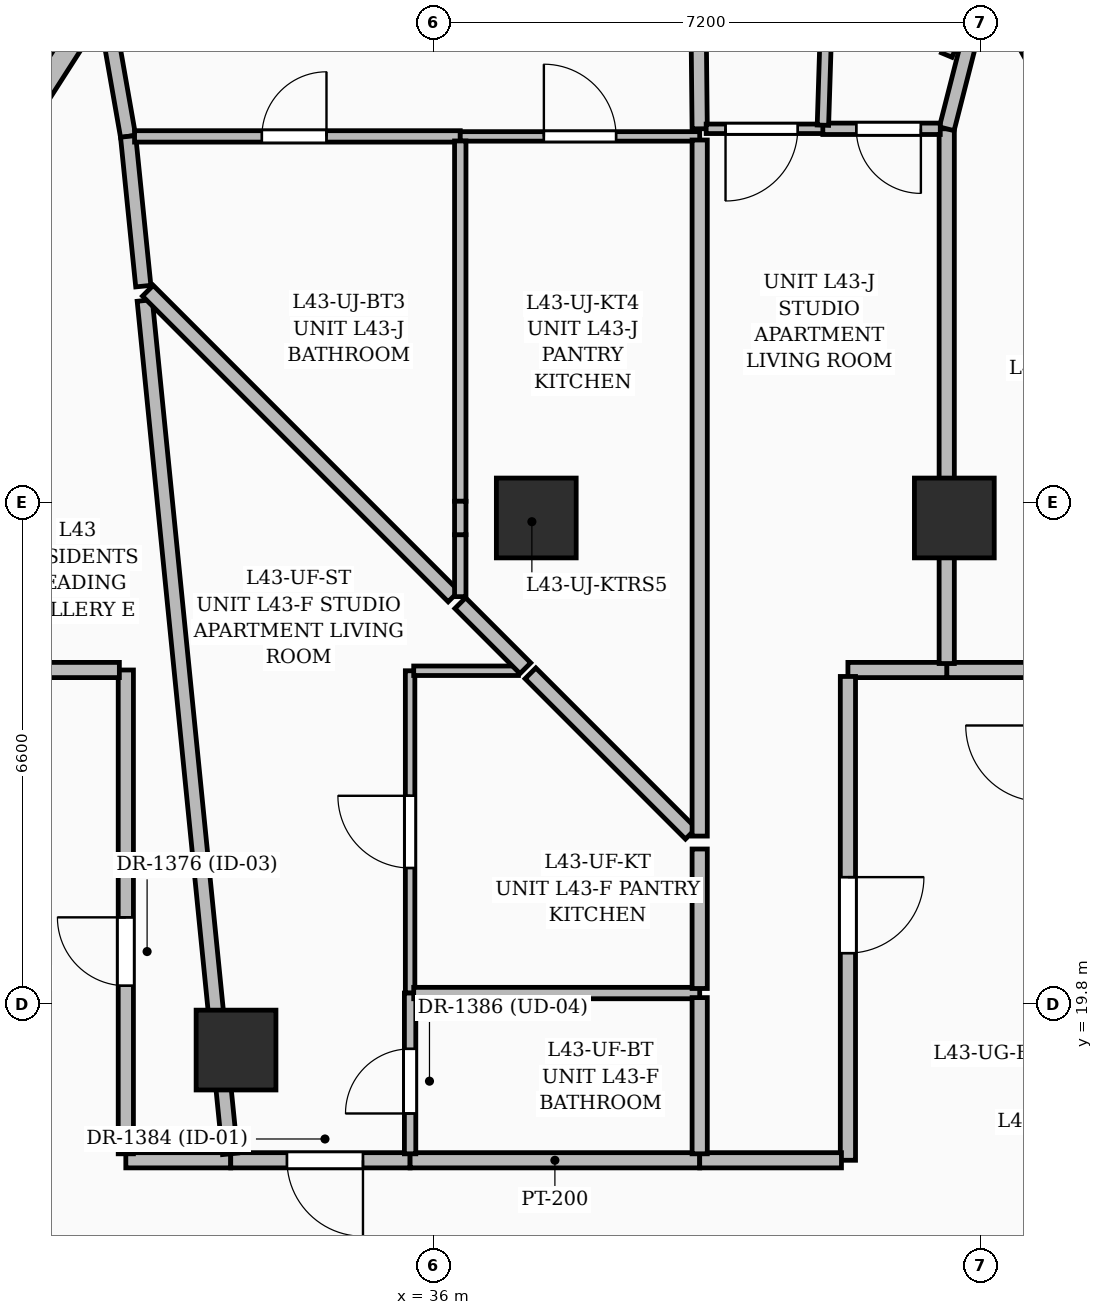
"""IFC4 building model, lengths in metres.
Left out: names, types, materials, properties, quantities, classifications, styles, units other than length and angle.
Written with IfcOpenShell. Run it as: python <this file> out.ifc"""

import sys

from ifc_helpers import new_model, si_unit, direction, frame, frame_2d, origin, origin_2d, place, context, subcontext, project, spatial, rectangle, extrude, element, fill, save


model = new_model("IFC4")
c1 = context("Model", 3, precision=1e-05, world=origin(), true_north=direction((0.0, 1.0)))
c2 = subcontext(c1, "Body", "Model", "MODEL_VIEW")
j1 = project(units=[si_unit("LENGTHUNIT", "METRE"), si_unit("PLANEANGLEUNIT", "RADIAN")], contexts=[c1])
p1 = place(None, origin())
s1 = spatial("IfcSite", under=j1, at=p1, CompositionType="ELEMENT")
p2 = place(p1, origin())
s2 = spatial("IfcBuilding", under=s1, at=p2, CompositionType="ELEMENT")
p3 = place(p2, frame((0.0, 0.0, 168.0)))
s3 = spatial("IfcBuildingStorey", under=s2, at=p3, CompositionType="ELEMENT", Elevation=168.0)
for number, where, z_axis, x_axis in (
    (1, (42.85, 26.2, 0.0), (0.0, 0.0, 1.0), (1.0, 0.0, 0.0)),
    (2, (37.35, 26.2, 0.0), (0.0, 0.0, 1.0), (1.0, 0.0, 0.0)),
    (3, (33.4, 19.2, 0.0), (0.0, 0.0, 1.0), (1.0, 0.0, 0.0)),
):
    element("IfcColumn", number, at=place(p3, frame(where, z_axis=z_axis, x_axis=x_axis)), inside=s3, PredefinedType="COLUMN", context=c2, shape_type="SweptSolid", body=[
        extrude(rectangle(XDim=1.05, YDim=1.05, at=origin_2d()), origin(), (0.0, 0.0, 1.0), 3.6),
    ])
p4 = place(p3, frame((27.986, 27.373, 0.0), z_axis=(0.0, 0.0, 1.0), x_axis=(0.539557017358, 0.841949063198, 0.0)))
e4 = element("IfcWall", 4, at=p4, inside=s3, PredefinedType="SOLIDWALL", context=c2, shape_type="SweptSolid", body=[
    extrude(rectangle(XDim=7.28, YDim=0.3, at=frame_2d((3.64, 0.0))), origin(), (0.0, 0.0, 1.0), 3.35),
])
p5 = place(p4, frame((0.9, 0.0, 0.6)))
e5 = element("IfcOpeningElement", 5, at=p5, cuts=e4, PredefinedType="OPENING", context=c2, shape_type="SweptSolid", body=[
    extrude(rectangle(XDim=1.5, YDim=2.1, at=frame_2d((0.75, 1.05))), frame((0.0, 0.16, 0.0), z_axis=(0.0, -1.0, 0.0), x_axis=(1.0, 0.0, 0.0)), (0.0, 0.0, 1.0), 0.32),
])
p6 = place(p3, frame((43.426, 33.195, 0.0), z_axis=(0.0, 0.0, 1.0), x_axis=(0.484187348611, -0.874964348671, 0.0)))
e6 = element("IfcWall", 6, at=p6, inside=s3, PredefinedType="SOLIDWALL", context=c2, shape_type="SweptSolid", body=[
    extrude(rectangle(XDim=7.451, YDim=0.3, at=frame_2d((3.726, 0.0))), origin(), (0.0, 0.0, 1.0), 3.35),
])
p7 = place(p6, frame((3.103, 0.0, 0.8)))
e7 = element("IfcOpeningElement", 7, at=p7, cuts=e6, PredefinedType="OPENING", context=c2, shape_type="SweptSolid", body=[
    extrude(rectangle(XDim=1.2, YDim=1.8, at=frame_2d((0.6, 0.9))), frame((0.0, 0.16, 0.0), z_axis=(0.0, -1.0, 0.0), x_axis=(1.0, 0.0, 0.0)), (0.0, 0.0, 1.0), 0.32),
])
p8 = place(p3, frame((33.33, 17.75, 0.0), z_axis=(0.0, 0.0, 1.0), x_axis=(-1.0, 0.0, 0.0)))
e8 = element("IfcWall", 8, at=p8, inside=s3, PredefinedType="PARTITIONING", context=c2, shape_type="SweptSolid", body=[
    extrude(rectangle(XDim=1.38, YDim=0.2, at=frame_2d((0.69, 0.0))), origin(), (0.0, 0.0, 1.0), 3.35),
])
p9 = place(p3, frame((31.95, 17.835, 0.0), z_axis=(0.0, 0.0, 1.0), x_axis=(0.0, 1.0, 0.0)))
e9 = element("IfcWall", 9, at=p9, inside=s3, PredefinedType="PARTITIONING", context=c2, shape_type="SweptSolid", body=[
    extrude(rectangle(XDim=6.365, YDim=0.2, at=frame_2d((3.183, 0.0))), origin(), (0.0, 0.0, 1.0), 2.393),
])
p10 = place(p9, frame((2.211, 0.0, 0.0)))
e10 = element("IfcOpeningElement", 10, at=p10, cuts=e9, PredefinedType="OPENING", context=c2, shape_type="SweptSolid", body=[
    extrude(rectangle(XDim=0.9, YDim=2.1, at=frame_2d((0.45, 1.05))), frame((0.0, 0.11, 0.0), z_axis=(0.0, -1.0, 0.0), x_axis=(1.0, 0.0, 0.0)), (0.0, 0.0, 1.0), 0.22),
])
p11 = place(p3, frame((31.865, 24.2, 0.0), z_axis=(0.0, 0.0, 1.0), x_axis=(-1.0, 0.0, 0.0)))
e11 = element("IfcWall", 11, at=p11, inside=s3, PredefinedType="PARTITIONING", context=c2, shape_type="SweptSolid", body=[
    extrude(rectangle(XDim=1.765, YDim=0.2, at=frame_2d((0.882, 0.0))), origin(), (0.0, 0.0, 1.0), 2.771),
])
p12 = place(p3, frame((35.69, 17.75, 0.0), z_axis=(0.0, 0.0, 1.0), x_axis=(-1.0, 0.0, 0.0)))
e12 = element("IfcWall", 12, at=p12, inside=s3, PredefinedType="PARTITIONING", context=c2, shape_type="SweptSolid", body=[
    extrude(rectangle(XDim=2.36, YDim=0.2, at=frame_2d((1.18, 0.0))), origin(), (0.0, 0.0, 1.0), 2.436),
])
p13 = place(p12, frame((0.62, 0.0, 0.0)))
e13 = element("IfcOpeningElement", 13, at=p13, cuts=e12, PredefinedType="OPENING", context=c2, shape_type="SweptSolid", body=[
    extrude(rectangle(XDim=1.0, YDim=2.2, at=frame_2d((0.5, 1.1))), frame((0.0, 0.11, 0.0), z_axis=(0.0, -1.0, 0.0), x_axis=(1.0, 0.0, 0.0)), (0.0, 0.0, 1.0), 0.22),
])
p14 = place(p3, frame((39.5, 17.75, 0.0), z_axis=(0.0, 0.0, 1.0), x_axis=(-1.0, 0.0, 0.0)))
e14 = element("IfcWall", 14, at=p14, inside=s3, PredefinedType="PARTITIONING", context=c2, shape_type="SweptSolid", body=[
    extrude(rectangle(XDim=3.81, YDim=0.2, at=frame_2d((1.905, 0.0))), origin(), (0.0, 0.0, 1.0), 3.35),
])
p15 = place(p3, frame((43.915, 24.2, 0.0), z_axis=(0.0, 0.0, 1.0), x_axis=(-1.0, 0.0, 0.0)))
e15 = element("IfcWall", 15, at=p15, inside=s3, PredefinedType="PARTITIONING", context=c2, shape_type="SweptSolid", body=[
    extrude(rectangle(XDim=1.165, YDim=0.2, at=frame_2d((0.583, 0.0))), origin(), (0.0, 0.0, 1.0), 2.436),
])
p16 = place(p3, frame((42.75, 24.2, 0.0), z_axis=(0.0, 0.0, 1.0), x_axis=(-1.0, 0.0, 0.0)))
e16 = element("IfcWall", 16, at=p16, inside=s3, PredefinedType="PARTITIONING", context=c2, shape_type="SweptSolid", body=[
    extrude(rectangle(XDim=1.3, YDim=0.2, at=frame_2d((0.65, 0.0))), origin(), (0.0, 0.0, 1.0), 3.35),
])
p17 = place(p3, frame((41.45, 24.115, 0.0), z_axis=(0.0, 0.0, 1.0), x_axis=(0.0, -1.0, 0.0)))
e17 = element("IfcWall", 17, at=p17, inside=s3, PredefinedType="PARTITIONING", context=c2, shape_type="SweptSolid", body=[
    extrude(rectangle(XDim=6.365, YDim=0.2, at=frame_2d((3.183, 0.0))), origin(), (0.0, 0.0, 1.0), 3.35),
])
p18 = place(p17, frame((2.64, 0.0, 0.0)))
e18 = element("IfcOpeningElement", 18, at=p18, cuts=e17, PredefinedType="OPENING", context=c2, shape_type="SweptSolid", body=[
    extrude(rectangle(XDim=1.0, YDim=2.2, at=frame_2d((0.5, 1.1))), frame((0.0, 0.11, 0.0), z_axis=(0.0, -1.0, 0.0), x_axis=(1.0, 0.0, 0.0)), (0.0, 0.0, 1.0), 0.22),
])
p19 = place(p3, frame((41.365, 17.75, 0.0), z_axis=(0.0, 0.0, 1.0), x_axis=(-1.0, 0.0, 0.0)))
e19 = element("IfcWall", 19, at=p19, inside=s3, PredefinedType="PARTITIONING", context=c2, shape_type="SweptSolid", body=[
    extrude(rectangle(XDim=1.865, YDim=0.2, at=frame_2d((0.933, 0.0))), origin(), (0.0, 0.0, 1.0), 3.35),
])
p20 = place(p3, frame((33.322, 17.835, 0.0), z_axis=(0.0, 0.0, 1.0), x_axis=(-0.099499433927, 0.99503761871, 0.0)))
e20 = element("IfcWall", 20, at=p20, inside=s3, PredefinedType="PARTITIONING", context=c2, shape_type="SweptSolid", body=[
    extrude(rectangle(XDim=11.282, YDim=0.2, at=frame_2d((5.641, 0.0))), origin(), (0.0, 0.0, 1.0), 2.393),
])
p21 = place(p3, frame((31.98, 31.22, 0.0), z_axis=(0.0, 0.0, 1.0), x_axis=(-0.17276967515, 0.984962252753, 0.0)))
e21 = element("IfcWall", 21, at=p21, inside=s3, PredefinedType="PARTITIONING", context=c2, shape_type="SweptSolid", body=[
    extrude(rectangle(XDim=1.673, YDim=0.2, at=frame_2d((0.836, 0.0))), origin(), (0.0, 0.0, 1.0), 2.57),
])
p22 = place(p3, frame((32.18, 29.25, 0.0), z_axis=(0.0, 0.0, 1.0), x_axis=(-0.100980739114, 0.994888380839, 0.0)))
e22 = element("IfcWall", 22, at=p22, inside=s3, PredefinedType="PARTITIONING", context=c2, shape_type="SweptSolid", body=[
    extrude(rectangle(XDim=1.98, YDim=0.2, at=frame_2d((0.99, 0.0))), origin(), (0.0, 0.0, 1.0), 2.57),
])
p23 = place(p3, frame((35.69, 19.95, 0.0), z_axis=(0.0, 0.0, 1.0), x_axis=(0.0, 1.0, 0.0)))
e23 = element("IfcWall", 23, at=p23, inside=s3, PredefinedType="PARTITIONING", context=c2, shape_type="SweptSolid", body=[
    extrude(rectangle(XDim=4.24, YDim=0.125, at=frame_2d((2.12, 0.0))), origin(), (0.0, 0.0, 1.0), 2.436),
])
p24 = place(p23, frame((1.645, 0.0, 0.0)))
e24 = element("IfcOpeningElement", 24, at=p24, cuts=e23, PredefinedType="OPENING", context=c2, shape_type="SweptSolid", body=[
    extrude(rectangle(XDim=0.95, YDim=2.2, at=frame_2d((0.475, 1.1))), frame((0.0, 0.072, 0.0), z_axis=(0.0, -1.0, 0.0), x_axis=(1.0, 0.0, 0.0)), (0.0, 0.0, 1.0), 0.145),
])
p25 = place(p3, frame((35.738, 24.19, 0.0), z_axis=(0.0, 0.0, 1.0), x_axis=(1.0, 0.0, 0.0)))
e25 = element("IfcWall", 25, at=p25, inside=s3, PredefinedType="PARTITIONING", context=c2, shape_type="SweptSolid", body=[
    extrude(rectangle(XDim=1.377, YDim=0.125, at=frame_2d((0.689, 0.0))), origin(), (0.0, 0.0, 1.0), 2.436),
])
p26 = place(p3, frame((35.69, 17.835, 0.0), z_axis=(0.0, 0.0, 1.0), x_axis=(0.0, 1.0, 0.0)))
e26 = element("IfcWall", 26, at=p26, inside=s3, PredefinedType="PARTITIONING", context=c2, shape_type="SweptSolid", body=[
    extrude(rectangle(XDim=2.115, YDim=0.15, at=frame_2d((1.058, 0.0))), origin(), (0.0, 0.0, 1.0), 3.35),
])
p27 = place(p26, frame((0.531, 0.0, 0.0)))
e27 = element("IfcOpeningElement", 27, at=p27, cuts=e26, PredefinedType="OPENING", context=c2, shape_type="SweptSolid", body=[
    extrude(rectangle(XDim=0.85, YDim=2.1, at=frame_2d((0.425, 1.05))), frame((0.0, 0.085, 0.0), z_axis=(0.0, -1.0, 0.0), x_axis=(1.0, 0.0, 0.0)), (0.0, 0.0, 1.0), 0.17),
])
p28 = place(p3, frame((36.262, 25.168, 0.0), z_axis=(0.0, 0.0, 1.0), x_axis=(-0.707128244111, 0.707085317611, 0.0)))
e28 = element("IfcWall", 28, at=p28, inside=s3, PredefinedType="PARTITIONING", context=c2, shape_type="SweptSolid", body=[
    extrude(rectangle(XDim=5.688, YDim=0.2, at=frame_2d((2.844, 0.0))), origin(), (0.0, 0.0, 1.0), 2.771),
])
p29 = place(p3, frame((37.206, 24.224, 0.0), z_axis=(0.0, 0.0, 1.0), x_axis=(-0.707005974747, 0.707207573257, 0.0)))
e29 = element("IfcWall", 29, at=p29, inside=s3, PredefinedType="PARTITIONING", context=c2, shape_type="SweptSolid", body=[
    extrude(rectangle(XDim=1.211, YDim=0.2, at=frame_2d((0.605, 0.0))), origin(), (0.0, 0.0, 1.0), 2.436),
])
p30 = place(p3, frame((35.738, 19.95, 0.0), z_axis=(0.0, 0.0, 1.0), x_axis=(1.0, 0.0, 0.0)))
e30 = element("IfcWall", 30, at=p30, inside=s3, PredefinedType="PARTITIONING", context=c2, shape_type="SweptSolid", body=[
    extrude(rectangle(XDim=3.762, YDim=0.15, at=frame_2d((1.881, 0.0))), origin(), (0.0, 0.0, 1.0), 3.35),
])
p31 = place(p3, frame((39.383, 22.047, 0.0), z_axis=(0.0, 0.0, 1.0), x_axis=(-0.707065866575, 0.707147693431, 0.0)))
e31 = element("IfcWall", 31, at=p31, inside=s3, PredefinedType="PARTITIONING", context=c2, shape_type="SweptSolid", body=[
    extrude(rectangle(XDim=2.984, YDim=0.2, at=frame_2d((1.492, 0.0))), origin(), (0.0, 0.0, 1.0), 3.35),
])
p32 = place(p3, frame((39.5, 20.01, 0.0), z_axis=(0.0, 0.0, 1.0), x_axis=(0.0, 1.0, 0.0)))
e32 = element("IfcWall", 32, at=p32, inside=s3, PredefinedType="PARTITIONING", context=c2, shape_type="SweptSolid", body=[
    extrude(rectangle(XDim=1.835, YDim=0.2, at=frame_2d((0.917, 0.0))), origin(), (0.0, 0.0, 1.0), 3.35),
])
p33 = place(p3, frame((39.5, 17.835, 0.0), z_axis=(0.0, 0.0, 1.0), x_axis=(0.0, 1.0, 0.0)))
e33 = element("IfcWall", 33, at=p33, inside=s3, PredefinedType="PARTITIONING", context=c2, shape_type="SweptSolid", body=[
    extrude(rectangle(XDim=2.055, YDim=0.2, at=frame_2d((1.027, 0.0))), origin(), (0.0, 0.0, 1.0), 3.35),
])
p34 = place(p3, frame((42.75, 31.32, 0.0), z_axis=(0.0, 0.0, 1.0), x_axis=(0.0, -1.0, 0.0)))
e34 = element("IfcWall", 34, at=p34, inside=s3, PredefinedType="PARTITIONING", context=c2, shape_type="SweptSolid", body=[
    extrude(rectangle(XDim=7.035, YDim=0.2, at=frame_2d((3.518, 0.0))), origin(), (0.0, 0.0, 1.0), 2.393),
])
p35 = place(p3, frame((43.228, 33.192, 0.0), z_axis=(0.0, 0.0, 1.0), x_axis=(-0.247320136716, -0.968933821257, 0.0)))
e35 = element("IfcWall", 35, at=p35, inside=s3, PredefinedType="PARTITIONING", context=c2, shape_type="SweptSolid", body=[
    extrude(rectangle(XDim=1.932, YDim=0.2, at=frame_2d((0.966, 0.0))), origin(), (0.0, 0.0, 1.0), 2.57),
])
p36 = place(p3, frame((32.065, 31.22, 0.0), z_axis=(0.0, 0.0, 1.0), x_axis=(1.0, 0.0, 0.0)))
e36 = element("IfcWall", 36, at=p36, inside=s3, PredefinedType="PARTITIONING", context=c2, shape_type="SweptSolid", body=[
    extrude(rectangle(XDim=4.285, YDim=0.15, at=frame_2d((2.143, 0.0))), origin(), (0.0, 0.0, 1.0), 2.393),
])
p37 = place(p36, frame((1.675, 0.0, 0.0)))
e37 = element("IfcOpeningElement", 37, at=p37, cuts=e36, PredefinedType="OPENING", context=c2, shape_type="SweptSolid", body=[
    extrude(rectangle(XDim=0.85, YDim=2.1, at=frame_2d((0.425, 1.05))), frame((0.0, 0.085, 0.0), z_axis=(0.0, -1.0, 0.0), x_axis=(1.0, 0.0, 0.0)), (0.0, 0.0, 1.0), 0.17),
])
p38 = place(p3, frame((36.35, 31.22, 0.0), z_axis=(0.0, 0.0, 1.0), x_axis=(1.0, 0.0, 0.0)))
e38 = element("IfcWall", 38, at=p38, inside=s3, PredefinedType="PARTITIONING", context=c2, shape_type="SweptSolid", body=[
    extrude(rectangle(XDim=3.15, YDim=0.125, at=frame_2d((1.575, 0.0))), origin(), (0.0, 0.0, 1.0), 2.771),
])
p39 = place(p38, frame((1.1, 0.0, 0.0)))
e39 = element("IfcOpeningElement", 39, at=p39, cuts=e38, PredefinedType="OPENING", context=c2, shape_type="SweptSolid", body=[
    extrude(rectangle(XDim=0.95, YDim=2.2, at=frame_2d((0.475, 1.1))), frame((0.0, 0.072, 0.0), z_axis=(0.0, -1.0, 0.0), x_axis=(1.0, 0.0, 0.0)), (0.0, 0.0, 1.0), 0.145),
])
p40 = place(p3, frame((39.5, 31.32, 0.0), z_axis=(0.0, 0.0, 1.0), x_axis=(-0.010545456067, 0.999944395132, 0.0)))
e40 = element("IfcWall", 40, at=p40, inside=s3, PredefinedType="PARTITIONING", context=c2, shape_type="SweptSolid", body=[
    extrude(rectangle(XDim=6.645, YDim=0.2, at=frame_2d((3.322, 0.0))), origin(), (0.0, 0.0, 1.0), 2.57),
])
p41 = place(p40, frame((2.889, 0.0, 0.0)))
e41 = element("IfcOpeningElement", 41, at=p41, cuts=e40, PredefinedType="OPENING", context=c2, shape_type="SweptSolid", body=[
    extrude(rectangle(XDim=1.0, YDim=2.2, at=frame_2d((0.5, 1.1))), frame((0.0, 0.11, 0.0), z_axis=(0.0, -1.0, 0.0), x_axis=(1.0, 0.0, 0.0)), (0.0, 0.0, 1.0), 0.22),
])
p42 = place(p3, frame((36.35, 25.165, 0.0), z_axis=(0.0, 0.0, 1.0), x_axis=(0.0, 1.0, 0.0)))
e42 = element("IfcWall", 42, at=p42, inside=s3, PredefinedType="PARTITIONING", context=c2, shape_type="SweptSolid", body=[
    extrude(rectangle(XDim=0.815, YDim=0.15, at=frame_2d((0.407, 0.0))), origin(), (0.0, 0.0, 1.0), 3.35),
])
p43 = place(p3, frame((36.35, 26.42, 0.0), z_axis=(0.0, 0.0, 1.0), x_axis=(0.0, 1.0, 0.0)))
e43 = element("IfcWall", 43, at=p43, inside=s3, PredefinedType="PARTITIONING", context=c2, shape_type="SweptSolid", body=[
    extrude(rectangle(XDim=4.74, YDim=0.15, at=frame_2d((2.37, 0.0))), origin(), (0.0, 0.0, 1.0), 2.393),
])
p44 = place(p3, frame((39.5, 22.015, 0.0), z_axis=(0.0, 0.0, 1.0), x_axis=(0.0, 1.0, 0.0)))
e44 = element("IfcWall", 44, at=p44, inside=s3, PredefinedType="PARTITIONING", context=c2, shape_type="SweptSolid", body=[
    extrude(rectangle(XDim=9.158, YDim=0.2, at=frame_2d((4.579, 0.0))), origin(), (0.0, 0.0, 1.0), 2.436),
])
p45 = place(p3, frame((41.13, 31.32, 0.0), z_axis=(0.0, 0.0, 1.0), x_axis=(-1.0, 0.0, 0.0)))
e45 = element("IfcWall", 45, at=p45, inside=s3, PredefinedType="PARTITIONING", context=c2, shape_type="SweptSolid", body=[
    extrude(rectangle(XDim=1.545, YDim=0.125, at=frame_2d((0.772, 0.0))), origin(), (0.0, 0.0, 1.0), 3.35),
])
p46 = place(p45, frame((0.34, 0.0, 0.0)))
e46 = element("IfcOpeningElement", 46, at=p46, cuts=e45, PredefinedType="OPENING", context=c2, shape_type="SweptSolid", body=[
    extrude(rectangle(XDim=0.95, YDim=2.2, at=frame_2d((0.475, 1.1))), frame((0.0, 0.072, 0.0), z_axis=(0.0, -1.0, 0.0), x_axis=(1.0, 0.0, 0.0)), (0.0, 0.0, 1.0), 0.145),
])
p47 = place(p3, frame((42.665, 31.32, 0.0), z_axis=(0.0, 0.0, 1.0), x_axis=(-1.0, 0.0, 0.0)))
e47 = element("IfcWall", 47, at=p47, inside=s3, PredefinedType="PARTITIONING", context=c2, shape_type="SweptSolid", body=[
    extrude(rectangle(XDim=1.545, YDim=0.15, at=frame_2d((0.772, 0.0))), origin(), (0.0, 0.0, 1.0), 2.393),
])
p48 = place(p47, frame((0.255, 0.0, 0.0)))
e48 = element("IfcOpeningElement", 48, at=p48, cuts=e47, PredefinedType="OPENING", context=c2, shape_type="SweptSolid", body=[
    extrude(rectangle(XDim=0.85, YDim=2.1, at=frame_2d((0.425, 1.05))), frame((0.0, 0.085, 0.0), z_axis=(0.0, -1.0, 0.0), x_axis=(1.0, 0.0, 0.0)), (0.0, 0.0, 1.0), 0.17),
])
p49 = place(p3, frame((41.121, 31.367, 0.0), z_axis=(0.0, 0.0, 1.0), x_axis=(0.031558472492, 0.999501907359, 0.0)))
e49 = element("IfcWall", 49, at=p49, inside=s3, PredefinedType="PARTITIONING", context=c2, shape_type="SweptSolid", body=[
    extrude(rectangle(XDim=5.415, YDim=0.15, at=frame_2d((2.708, 0.0))), origin(), (0.0, 0.0, 1.0), 2.57),
])
p50 = place(p3, frame((36.35, 25.98, 0.0), z_axis=(0.0, 0.0, 1.0), x_axis=(0.0, 1.0, 0.0)))
e50 = element("IfcWall", 50, at=p50, inside=s3, PredefinedType="PARTITIONING", context=c2, shape_type="SweptSolid", body=[
    extrude(rectangle(XDim=0.44, YDim=0.15, at=frame_2d((0.22, 0.0))), origin(), (0.0, 0.0, 1.0), 3.35),
])
p51 = place(p3, frame((42.75, 32.29, 0.0), z_axis=(0.0, 0.0, 1.0), x_axis=(0.38662798091, 0.922235763987, 0.0)))
e51 = element("IfcWall", 51, at=p51, inside=s3, PredefinedType="PARTITIONING", context=c2, shape_type="SweptSolid", body=[
    extrude(rectangle(XDim=1.154, YDim=0.15, at=frame_2d((0.577, 0.0))), origin(), (0.0, 0.0, 1.0), 2.57),
])
p52 = place(p10, origin())
e52 = element("IfcDoor", 52, at=p52, inside=s3, OperationType="SINGLE_SWING_RIGHT", PredefinedType="DOOR", context=c2, shape_type="SweptSolid", body=[
    extrude(rectangle(XDim=0.9, YDim=2.1, at=frame_2d((0.45, 1.05))), frame((0.0, 0.025, 0.0), z_axis=(0.0, -1.0, 0.0), x_axis=(1.0, 0.0, 0.0)), (0.0, 0.0, 1.0), 0.05),
])
fill(e10, e52)
p53 = place(p13, origin())
e53 = element("IfcDoor", 53, at=p53, inside=s3, OperationType="SINGLE_SWING_LEFT", PredefinedType="DOOR", context=c2, shape_type="SweptSolid", body=[
    extrude(rectangle(XDim=1.0, YDim=2.2, at=frame_2d((0.5, 1.1))), frame((0.0, 0.025, 0.0), z_axis=(0.0, -1.0, 0.0), x_axis=(1.0, 0.0, 0.0)), (0.0, 0.0, 1.0), 0.05),
])
fill(e13, e53)
p54 = place(p24, origin())
e54 = element("IfcDoor", 54, at=p54, inside=s3, OperationType="SINGLE_SWING_RIGHT", PredefinedType="DOOR", context=c2, shape_type="SweptSolid", body=[
    extrude(rectangle(XDim=0.95, YDim=2.2, at=frame_2d((0.475, 1.1))), frame((0.0, 0.025, 0.0), z_axis=(0.0, -1.0, 0.0), x_axis=(1.0, 0.0, 0.0)), (0.0, 0.0, 1.0), 0.05),
])
fill(e24, e54)
p55 = place(p27, origin())
e55 = element("IfcDoor", 55, at=p55, inside=s3, OperationType="SINGLE_SWING_LEFT", PredefinedType="DOOR", context=c2, shape_type="SweptSolid", body=[
    extrude(rectangle(XDim=0.85, YDim=2.1, at=frame_2d((0.425, 1.05))), frame((0.0, 0.025, 0.0), z_axis=(0.0, -1.0, 0.0), x_axis=(1.0, 0.0, 0.0)), (0.0, 0.0, 1.0), 0.05),
])
fill(e27, e55)
p56 = place(p39, origin())
e56 = element("IfcDoor", 56, at=p56, inside=s3, OperationType="SINGLE_SWING_LEFT", PredefinedType="DOOR", context=c2, shape_type="SweptSolid", body=[
    extrude(rectangle(XDim=0.95, YDim=2.2, at=frame_2d((0.475, 1.1))), frame((0.0, 0.025, 0.0), z_axis=(0.0, -1.0, 0.0), x_axis=(1.0, 0.0, 0.0)), (0.0, 0.0, 1.0), 0.05),
])
fill(e39, e56)
p57 = place(p37, origin())
e57 = element("IfcDoor", 57, at=p57, inside=s3, OperationType="SINGLE_SWING_RIGHT", PredefinedType="DOOR", context=c2, shape_type="SweptSolid", body=[
    extrude(rectangle(XDim=0.85, YDim=2.1, at=frame_2d((0.425, 1.05))), frame((0.0, 0.025, 0.0), z_axis=(0.0, -1.0, 0.0), x_axis=(1.0, 0.0, 0.0)), (0.0, 0.0, 1.0), 0.05),
])
fill(e37, e57)
p58 = place(p18, origin())
e58 = element("IfcDoor", 58, at=p58, inside=s3, OperationType="SINGLE_SWING_LEFT", PredefinedType="DOOR", context=c2, shape_type="SweptSolid", body=[
    extrude(rectangle(XDim=1.0, YDim=2.2, at=frame_2d((0.5, 1.1))), frame((0.0, 0.025, 0.0), z_axis=(0.0, -1.0, 0.0), x_axis=(1.0, 0.0, 0.0)), (0.0, 0.0, 1.0), 0.05),
])
fill(e18, e58)
p59 = place(p46, origin())
e59 = element("IfcDoor", 59, at=p59, inside=s3, OperationType="SINGLE_SWING_RIGHT", PredefinedType="DOOR", context=c2, shape_type="SweptSolid", body=[
    extrude(rectangle(XDim=0.95, YDim=2.2, at=frame_2d((0.475, 1.1))), frame((0.0, 0.025, 0.0), z_axis=(0.0, -1.0, 0.0), x_axis=(1.0, 0.0, 0.0)), (0.0, 0.0, 1.0), 0.05),
])
fill(e46, e59)
p60 = place(p48, origin())
e60 = element("IfcDoor", 60, at=p60, inside=s3, OperationType="SINGLE_SWING_LEFT", PredefinedType="DOOR", context=c2, shape_type="SweptSolid", body=[
    extrude(rectangle(XDim=0.85, YDim=2.1, at=frame_2d((0.425, 1.05))), frame((0.0, 0.025, 0.0), z_axis=(0.0, -1.0, 0.0), x_axis=(1.0, 0.0, 0.0)), (0.0, 0.0, 1.0), 0.05),
])
fill(e48, e60)
save(model, sys.argv[1])
